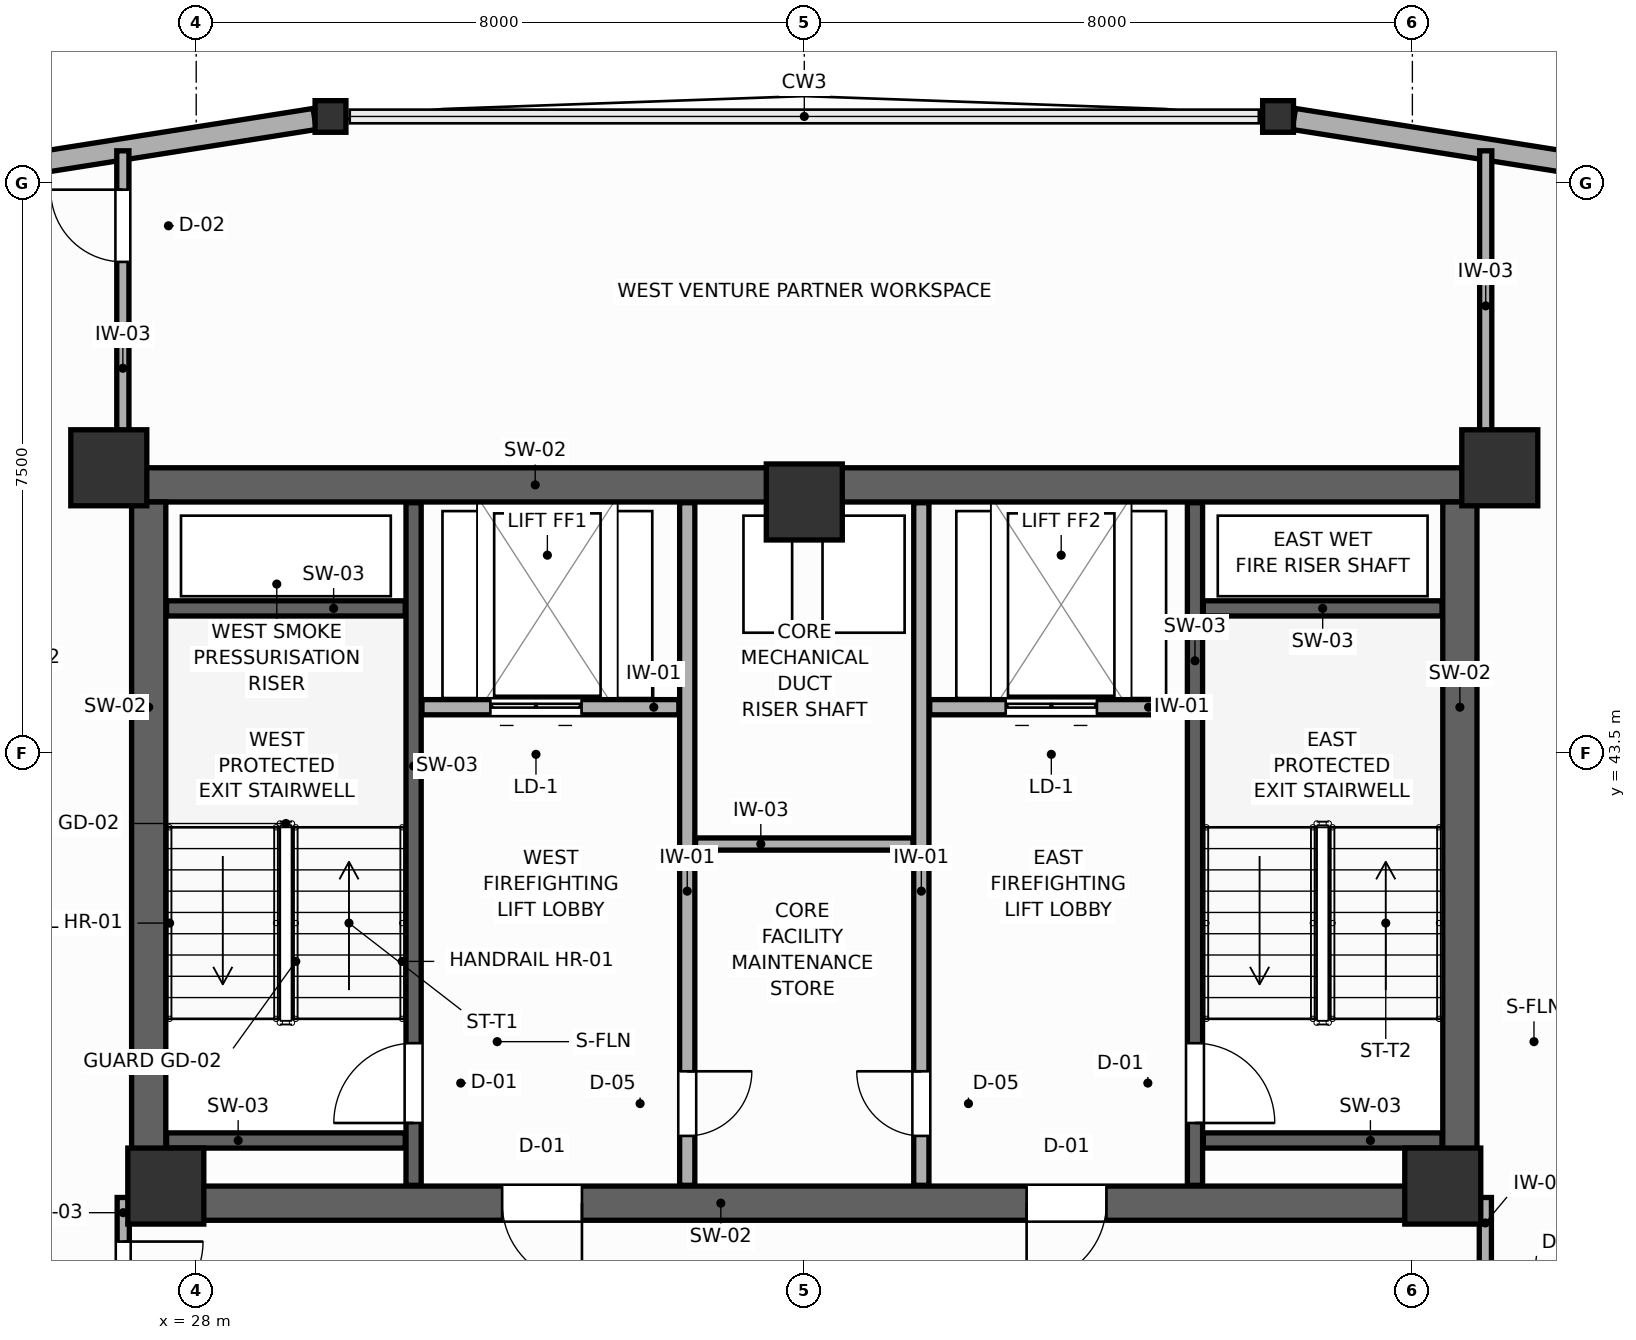
"""IFC4 building model, lengths in metres.
Left out: names, types, materials, properties, quantities, classifications, styles, units other than length and angle.
Written with IfcOpenShell. Run it as: python <this file> out.ifc"""

import sys

from ifc_helpers import new_model, si_unit, direction, frame, frame_2d, origin, origin_2d, place, context, subcontext, project, spatial, rectangle, i_section, extrude, source, transform, mapped, element, fill, save


model = new_model("IFC4")
c1 = context("Model", 3, precision=1e-05, world=origin(), true_north=direction((0.0, 1.0)))
c2 = subcontext(c1, "Body", "Model", "MODEL_VIEW")
j1 = project(units=[si_unit("LENGTHUNIT", "METRE"), si_unit("PLANEANGLEUNIT", "RADIAN")], contexts=[c1])
p1 = place(None, origin())
s1 = spatial("IfcSite", under=j1, at=p1, CompositionType="ELEMENT")
p2 = place(p1, origin())
s2 = spatial("IfcBuilding", under=s1, at=p2, CompositionType="ELEMENT")
p3 = place(p2, frame((0.0, 0.0, 190.2)))
s3 = spatial("IfcBuildingStorey", under=s2, at=p3, CompositionType="ELEMENT", Elevation=190.2)
p4 = place(p3, frame((27.15, 47.025, 0.0), z_axis=(0.0, 0.0, 1.0), x_axis=(1.0, 0.0, 0.0)))
e1 = element("IfcWall", 1, at=p4, inside=s3, PredefinedType="SHEAR", context=c2, shape_type="SweptSolid", body=[
    extrude(rectangle(XDim=17.7, YDim=0.45, at=frame_2d((8.85, 0.0))), origin(), (0.0, 0.0, 1.0), 3.6),
])
p5 = place(p3, frame((27.15, 37.575, 0.0), z_axis=(0.0, 0.0, 1.0), x_axis=(1.0, 0.0, 0.0)))
e2 = element("IfcWall", 2, at=p5, inside=s3, PredefinedType="SHEAR", context=c2, shape_type="SweptSolid", body=[
    extrude(rectangle(XDim=17.7, YDim=0.45, at=frame_2d((8.85, 0.0))), origin(), (0.0, 0.0, 1.0), 3.6),
])
p6 = place(p5, frame((4.875, 0.0, 0.0)))
e3 = element("IfcOpeningElement", 3, at=p6, cuts=e2, PredefinedType="OPENING", context=c2, shape_type="SweptSolid", body=[
    extrude(rectangle(XDim=1.05, YDim=2.1, at=frame_2d((0.525, 1.05))), frame((0.0, 0.235, 0.0), z_axis=(0.0, -1.0, 0.0), x_axis=(1.0, 0.0, 0.0)), (0.0, 0.0, 1.0), 0.47),
])
p7 = place(p5, frame((11.775, 0.0, 0.0)))
e4 = element("IfcOpeningElement", 4, at=p7, cuts=e2, PredefinedType="OPENING", context=c2, shape_type="SweptSolid", body=[
    extrude(rectangle(XDim=1.05, YDim=2.1, at=frame_2d((0.525, 1.05))), frame((0.0, 0.235, 0.0), z_axis=(0.0, -1.0, 0.0), x_axis=(1.0, 0.0, 0.0)), (0.0, 0.0, 1.0), 0.47),
])
for number, where, z_axis, x_axis in (
    (5, (27.375, 37.8, 0.0), (0.0, 0.0, 1.0), (0.0, 1.0, 0.0)),
    (6, (44.625, 37.8, 0.0), (0.0, 0.0, 1.0), (0.0, 1.0, 0.0)),
):
    element("IfcWall", number, at=place(p3, frame(where, z_axis=z_axis, x_axis=x_axis)), inside=s3, PredefinedType="SHEAR", context=c2, shape_type="SweptSolid", body=[
        extrude(rectangle(XDim=9.0, YDim=0.45, at=frame_2d((4.5, 0.0))), origin(), (0.0, 0.0, 1.0), 3.6),
    ])
m1 = source(origin(), c2, "Body", "SweptSolid", [
    extrude(rectangle(XDim=1.0, YDim=1.0, at=origin_2d()), origin(), (0.0, 0.0, 1.0), 3.6),
])
for number, where, z_axis, x_axis in (
    (7, (26.85, 47.25, 0.0), (0.0, 0.0, 1.0), (1.0, 0.0, 0.0)),
    (8, (45.15, 47.25, 0.0), (0.0, 0.0, 1.0), (1.0, 0.0, 0.0)),
    (9, (27.6, 37.8, 0.0), (0.0, 0.0, 1.0), (1.0, 0.0, 0.0)),
    (10, (44.4, 37.8, 0.0), (0.0, 0.0, 1.0), (1.0, 0.0, 0.0)),
    (11, (36.0, 46.8, 0.0), (0.0, 0.0, 1.0), (1.0, 0.0, 0.0)),
):
    element("IfcColumn", number, at=place(p3, frame(where, z_axis=z_axis, x_axis=x_axis)), inside=s3, PredefinedType="COLUMN", context=c2, shape_type="MappedRepresentation", body=[
        mapped(m1, transform((0.0, 0.0, 0.0), scale=1.0)),
    ])
m2 = source(origin(), c2, "Body", "SweptSolid", [
    extrude(i_section(OverallWidth=0.406, OverallDepth=0.416, WebThickness=0.027, FlangeThickness=0.044, FilletRadius=0.015, at=origin_2d()), origin(), (0.0, 0.0, 1.0), 3.6),
])
for number, where, z_axis, x_axis in (
    (12, (42.233, 51.872, 0.0), (0.0, 0.0, 1.0), (1.0, 0.0, 0.0)),
    (13, (29.767, 51.872, 0.0), (0.0, 0.0, 1.0), (1.0, 0.0, 0.0)),
):
    element("IfcColumn", number, at=place(p3, frame(where, z_axis=z_axis, x_axis=x_axis)), inside=s3, PredefinedType="COLUMN", context=c2, shape_type="MappedRepresentation", body=[
        mapped(m2, transform((0.0, 0.0, 0.0), scale=1.0)),
    ])
p8 = place(p3, frame((56.258, 49.656, 0.0), z_axis=(0.0, 0.0, 1.0), x_axis=(-0.987743003355, 0.15608894683, 0.0)))
e14 = element("IfcWall", 14, at=p8, inside=s3, PredefinedType="SOLIDWALL", context=c2, shape_type="SweptSolid", body=[
    extrude(rectangle(XDim=13.988, YDim=0.28, at=frame_2d((6.994, 0.0))), origin(), (0.0, 0.0, 1.0), 3.01),
])
p9 = place(p3, frame((29.559, 51.839, 0.0), z_axis=(0.0, 0.0, 1.0), x_axis=(-0.987743003355, -0.15608894683, 0.0)))
e15 = element("IfcWall", 15, at=p9, inside=s3, PredefinedType="SOLIDWALL", context=c2, shape_type="SweptSolid", body=[
    extrude(rectangle(XDim=13.988, YDim=0.28, at=frame_2d((6.994, 0.0))), origin(), (0.0, 0.0, 1.0), 2.95),
])
p10 = place(p3, frame((30.86, 37.81, 0.0), z_axis=(0.0, 0.0, 1.0), x_axis=(0.0, 1.0, 0.0)))
e16 = element("IfcWall", 16, at=p10, inside=s3, PredefinedType="SHEAR", context=c2, shape_type="SweptSolid", body=[
    extrude(rectangle(XDim=8.98, YDim=0.2, at=frame_2d((4.49, 0.0))), origin(), (0.0, 0.0, 1.0), 3.6),
])
p11 = place(p10, frame((0.82, 0.0, 0.0)))
e17 = element("IfcOpeningElement", 17, at=p11, cuts=e16, PredefinedType="OPENING", context=c2, shape_type="SweptSolid", body=[
    extrude(rectangle(XDim=1.05, YDim=2.1, at=frame_2d((0.525, 1.05))), frame((0.0, 0.11, 0.0), z_axis=(0.0, -1.0, 0.0), x_axis=(1.0, 0.0, 0.0)), (0.0, 0.0, 1.0), 0.22),
])
for number, where, z_axis, x_axis in (
    (18, (27.61, 45.4, 0.0), (0.0, 0.0, 1.0), (1.0, 0.0, 0.0)),
    (19, (27.61, 38.4, 0.0), (0.0, 0.0, 1.0), (1.0, 0.0, 0.0)),
):
    element("IfcWall", number, at=place(p3, frame(where, z_axis=z_axis, x_axis=x_axis)), inside=s3, PredefinedType="SHEAR", context=c2, shape_type="SweptSolid", body=[
        extrude(rectangle(XDim=3.14, YDim=0.2, at=frame_2d((1.57, 0.0))), origin(), (0.0, 0.0, 1.0), 3.6),
    ])
p12 = place(p3, frame((41.14, 37.81, 0.0), z_axis=(0.0, 0.0, 1.0), x_axis=(0.0, 1.0, 0.0)))
e20 = element("IfcWall", 20, at=p12, inside=s3, PredefinedType="SHEAR", context=c2, shape_type="SweptSolid", body=[
    extrude(rectangle(XDim=8.98, YDim=0.2, at=frame_2d((4.49, 0.0))), origin(), (0.0, 0.0, 1.0), 3.6),
])
p13 = place(p12, frame((0.82, 0.0, 0.0)))
e21 = element("IfcOpeningElement", 21, at=p13, cuts=e20, PredefinedType="OPENING", context=c2, shape_type="SweptSolid", body=[
    extrude(rectangle(XDim=1.05, YDim=2.1, at=frame_2d((0.525, 1.05))), frame((0.0, 0.11, 0.0), z_axis=(0.0, -1.0, 0.0), x_axis=(1.0, 0.0, 0.0)), (0.0, 0.0, 1.0), 0.22),
])
for number, where, z_axis, x_axis in (
    (22, (41.25, 45.4, 0.0), (0.0, 0.0, 1.0), (1.0, 0.0, 0.0)),
    (23, (41.25, 38.4, 0.0), (0.0, 0.0, 1.0), (1.0, 0.0, 0.0)),
):
    element("IfcWall", number, at=place(p3, frame(where, z_axis=z_axis, x_axis=x_axis)), inside=s3, PredefinedType="SHEAR", context=c2, shape_type="SweptSolid", body=[
        extrude(rectangle(XDim=3.14, YDim=0.2, at=frame_2d((1.57, 0.0))), origin(), (0.0, 0.0, 1.0), 3.6),
    ])
p14 = place(p3, frame((30.97, 44.1, 0.0), z_axis=(0.0, 0.0, 1.0), x_axis=(1.0, 0.0, 0.0)))
e24 = element("IfcWall", 24, at=p14, inside=s3, PredefinedType="PARTITIONING", context=c2, shape_type="SweptSolid", body=[
    extrude(rectangle(XDim=3.38, YDim=0.2, at=frame_2d((1.69, 0.0))), origin(), (0.0, 0.0, 1.0), 3.4),
])
p15 = place(p14, frame((0.9, 0.0, 0.0)))
e25 = element("IfcOpeningElement", 25, at=p15, cuts=e24, PredefinedType="OPENING", context=c2, shape_type="SweptSolid", body=[
    extrude(rectangle(XDim=1.2, YDim=2.1, at=frame_2d((0.6, 1.05))), frame((0.0, 0.11, 0.0), z_axis=(0.0, -1.0, 0.0), x_axis=(1.0, 0.0, 0.0)), (0.0, 0.0, 1.0), 0.22),
])
p16 = place(p3, frame((37.65, 44.1, 0.0), z_axis=(0.0, 0.0, 1.0), x_axis=(1.0, 0.0, 0.0)))
e26 = element("IfcWall", 26, at=p16, inside=s3, PredefinedType="PARTITIONING", context=c2, shape_type="SweptSolid", body=[
    extrude(rectangle(XDim=3.38, YDim=0.2, at=frame_2d((1.69, 0.0))), origin(), (0.0, 0.0, 1.0), 3.4),
])
p17 = place(p16, frame((1.0, 0.0, 0.0)))
e27 = element("IfcOpeningElement", 27, at=p17, cuts=e26, PredefinedType="OPENING", context=c2, shape_type="SweptSolid", body=[
    extrude(rectangle(XDim=1.2, YDim=2.1, at=frame_2d((0.6, 1.05))), frame((0.0, 0.11, 0.0), z_axis=(0.0, -1.0, 0.0), x_axis=(1.0, 0.0, 0.0)), (0.0, 0.0, 1.0), 0.22),
])
p18 = place(p3, frame((34.46, 37.81, 0.0), z_axis=(0.0, 0.0, 1.0), x_axis=(0.0, 1.0, 0.0)))
e28 = element("IfcWall", 28, at=p18, inside=s3, PredefinedType="PARTITIONING", context=c2, shape_type="SweptSolid", body=[
    extrude(rectangle(XDim=8.98, YDim=0.2, at=frame_2d((4.49, 0.0))), origin(), (0.0, 0.0, 1.0), 3.4),
])
p19 = place(p18, frame((0.65, 0.0, 0.0)))
e29 = element("IfcOpeningElement", 29, at=p19, cuts=e28, PredefinedType="OPENING", context=c2, shape_type="SweptSolid", body=[
    extrude(rectangle(XDim=0.85, YDim=2.05, at=frame_2d((0.425, 1.025))), frame((0.0, 0.11, 0.0), z_axis=(0.0, -1.0, 0.0), x_axis=(1.0, 0.0, 0.0)), (0.0, 0.0, 1.0), 0.22),
])
p20 = place(p3, frame((37.54, 37.81, 0.0), z_axis=(0.0, 0.0, 1.0), x_axis=(0.0, 1.0, 0.0)))
e30 = element("IfcWall", 30, at=p20, inside=s3, PredefinedType="PARTITIONING", context=c2, shape_type="SweptSolid", body=[
    extrude(rectangle(XDim=8.98, YDim=0.2, at=frame_2d((4.49, 0.0))), origin(), (0.0, 0.0, 1.0), 3.4),
])
p21 = place(p20, frame((0.65, 0.0, 0.0)))
e31 = element("IfcOpeningElement", 31, at=p21, cuts=e30, PredefinedType="OPENING", context=c2, shape_type="SweptSolid", body=[
    extrude(rectangle(XDim=0.85, YDim=2.05, at=frame_2d((0.425, 1.025))), frame((0.0, 0.11, 0.0), z_axis=(0.0, -1.0, 0.0), x_axis=(1.0, 0.0, 0.0)), (0.0, 0.0, 1.0), 0.22),
])
p22 = place(p3, frame((34.57, 42.3, 0.0), z_axis=(0.0, 0.0, 1.0), x_axis=(1.0, 0.0, 0.0)))
e32 = element("IfcWall", 32, at=p22, inside=s3, PredefinedType="PARTITIONING", context=c2, shape_type="SweptSolid", body=[
    extrude(rectangle(XDim=2.86, YDim=0.16, at=frame_2d((1.43, 0.0))), origin(), (0.0, 0.0, 1.0), 3.4),
])
p23 = place(p3, frame((27.04, 35.54, 0.0), z_axis=(0.0, 0.0, 1.0), x_axis=(0.0, 1.0, 0.0)))
e33 = element("IfcWall", 33, at=p23, inside=s3, PredefinedType="PARTITIONING", context=c2, shape_type="SweptSolid", body=[
    extrude(rectangle(XDim=2.11, YDim=0.16, at=frame_2d((1.055, 0.0))), origin(), (0.0, 0.0, 1.0), 3.4),
])
p24 = place(p23, frame((0.48, 0.0, 0.0)))
e34 = element("IfcOpeningElement", 34, at=p24, cuts=e33, PredefinedType="OPENING", context=c2, shape_type="SweptSolid", body=[
    extrude(rectangle(XDim=1.05, YDim=2.1, at=frame_2d((0.525, 1.05))), frame((0.0, 0.09, 0.0), z_axis=(0.0, -1.0, 0.0), x_axis=(1.0, 0.0, 0.0)), (0.0, 0.0, 1.0), 0.18),
])
p25 = place(p3, frame((44.96, 35.0, 0.0), z_axis=(0.0, 0.0, 1.0), x_axis=(0.0, 1.0, 0.0)))
e35 = element("IfcWall", 35, at=p25, inside=s3, PredefinedType="PARTITIONING", context=c2, shape_type="SweptSolid", body=[
    extrude(rectangle(XDim=2.65, YDim=0.16, at=frame_2d((1.325, 0.0))), origin(), (0.0, 0.0, 1.0), 3.4),
])
p26 = place(p25, frame((0.75, 0.0, 0.0)))
e36 = element("IfcOpeningElement", 36, at=p26, cuts=e35, PredefinedType="OPENING", context=c2, shape_type="SweptSolid", body=[
    extrude(rectangle(XDim=1.05, YDim=2.1, at=frame_2d((0.525, 1.05))), frame((0.0, 0.09, 0.0), z_axis=(0.0, -1.0, 0.0), x_axis=(1.0, 0.0, 0.0)), (0.0, 0.0, 1.0), 0.18),
])
p27 = place(p3, frame((27.035, 47.34, 0.0), z_axis=(0.0, 0.0, 1.0), x_axis=(0.0, 1.0, 0.0)))
e37 = element("IfcWall", 37, at=p27, inside=s3, PredefinedType="PARTITIONING", context=c2, shape_type="SweptSolid", body=[
    extrude(rectangle(XDim=4.08, YDim=0.16, at=frame_2d((2.04, 0.0))), origin(), (0.0, 0.0, 1.0), 3.4),
])
p28 = place(p27, frame((2.618, 0.0, 0.0)))
e38 = element("IfcOpeningElement", 38, at=p28, cuts=e37, PredefinedType="OPENING", context=c2, shape_type="SweptSolid", body=[
    extrude(rectangle(XDim=0.95, YDim=2.05, at=frame_2d((0.475, 1.025))), frame((0.0, 0.09, 0.0), z_axis=(0.0, -1.0, 0.0), x_axis=(1.0, 0.0, 0.0)), (0.0, 0.0, 1.0), 0.18),
])
p29 = place(p3, frame((44.965, 47.34, 0.0), z_axis=(0.0, 0.0, 1.0), x_axis=(0.0, 1.0, 0.0)))
e39 = element("IfcWall", 39, at=p29, inside=s3, PredefinedType="PARTITIONING", context=c2, shape_type="SweptSolid", body=[
    extrude(rectangle(XDim=4.08, YDim=0.16, at=frame_2d((2.04, 0.0))), origin(), (0.0, 0.0, 1.0), 3.4),
])
p30 = place(p11, origin())
e40 = element("IfcDoor", 40, at=p30, inside=s3, OperationType="SINGLE_SWING_LEFT", PredefinedType="DOOR", context=c2, shape_type="SweptSolid", body=[
    extrude(rectangle(XDim=1.05, YDim=2.1, at=frame_2d((0.525, 1.05))), frame((0.0, 0.025, 0.0), z_axis=(0.0, -1.0, 0.0), x_axis=(1.0, 0.0, 0.0)), (0.0, 0.0, 1.0), 0.05),
])
fill(e17, e40)
p31 = place(p13, frame((1.05, 0.0, 0.0), z_axis=(0.0, 0.0, 1.0), x_axis=(-1.0, 0.0, 0.0)))
e41 = element("IfcDoor", 41, at=p31, inside=s3, OperationType="SINGLE_SWING_RIGHT", PredefinedType="DOOR", context=c2, shape_type="SweptSolid", body=[
    extrude(rectangle(XDim=1.05, YDim=2.1, at=frame_2d((0.525, 1.05))), frame((0.0, 0.025, 0.0), z_axis=(0.0, -1.0, 0.0), x_axis=(1.0, 0.0, 0.0)), (0.0, 0.0, 1.0), 0.05),
])
fill(e21, e41)
p32 = place(p15, origin())
e42 = element("IfcDoor", 42, at=p32, inside=s3, OperationType="DOUBLE_DOOR_SLIDING", PredefinedType="DOOR", context=c2, shape_type="SweptSolid", body=[
    extrude(rectangle(XDim=1.2, YDim=2.1, at=frame_2d((0.6, 1.05))), frame((0.0, 0.025, 0.0), z_axis=(0.0, -1.0, 0.0), x_axis=(1.0, 0.0, 0.0)), (0.0, 0.0, 1.0), 0.05),
])
fill(e25, e42)
p33 = place(p17, origin())
e43 = element("IfcDoor", 43, at=p33, inside=s3, OperationType="DOUBLE_DOOR_SLIDING", PredefinedType="DOOR", context=c2, shape_type="SweptSolid", body=[
    extrude(rectangle(XDim=1.2, YDim=2.1, at=frame_2d((0.6, 1.05))), frame((0.0, 0.025, 0.0), z_axis=(0.0, -1.0, 0.0), x_axis=(1.0, 0.0, 0.0)), (0.0, 0.0, 1.0), 0.05),
])
fill(e27, e43)
p34 = place(p19, frame((0.85, 0.0, 0.0), z_axis=(0.0, 0.0, 1.0), x_axis=(-1.0, 0.0, 0.0)))
e44 = element("IfcDoor", 44, at=p34, inside=s3, OperationType="SINGLE_SWING_LEFT", PredefinedType="DOOR", context=c2, shape_type="SweptSolid", body=[
    extrude(rectangle(XDim=0.85, YDim=2.05, at=frame_2d((0.425, 1.025))), frame((0.0, 0.025, 0.0), z_axis=(0.0, -1.0, 0.0), x_axis=(1.0, 0.0, 0.0)), (0.0, 0.0, 1.0), 0.05),
])
fill(e29, e44)
p35 = place(p21, origin())
e45 = element("IfcDoor", 45, at=p35, inside=s3, OperationType="SINGLE_SWING_RIGHT", PredefinedType="DOOR", context=c2, shape_type="SweptSolid", body=[
    extrude(rectangle(XDim=0.85, YDim=2.05, at=frame_2d((0.425, 1.025))), frame((0.0, 0.025, 0.0), z_axis=(0.0, -1.0, 0.0), x_axis=(1.0, 0.0, 0.0)), (0.0, 0.0, 1.0), 0.05),
])
fill(e31, e45)
p36 = place(p24, frame((1.05, 0.0, 0.0), z_axis=(0.0, 0.0, 1.0), x_axis=(-1.0, 0.0, 0.0)))
e46 = element("IfcDoor", 46, at=p36, inside=s3, OperationType="SINGLE_SWING_LEFT", PredefinedType="DOOR", context=c2, shape_type="SweptSolid", body=[
    extrude(rectangle(XDim=1.05, YDim=2.1, at=frame_2d((0.525, 1.05))), frame((0.0, 0.025, 0.0), z_axis=(0.0, -1.0, 0.0), x_axis=(1.0, 0.0, 0.0)), (0.0, 0.0, 1.0), 0.05),
])
fill(e34, e46)
p37 = place(p28, origin())
e47 = element("IfcDoor", 47, at=p37, inside=s3, OperationType="SINGLE_SWING_RIGHT", PredefinedType="DOOR", context=c2, shape_type="SweptSolid", body=[
    extrude(rectangle(XDim=0.95, YDim=2.05, at=frame_2d((0.475, 1.025))), frame((0.0, 0.025, 0.0), z_axis=(0.0, -1.0, 0.0), x_axis=(1.0, 0.0, 0.0)), (0.0, 0.0, 1.0), 0.05),
])
fill(e38, e47)
p38 = place(p6, frame((1.05, 0.0, 0.0), z_axis=(0.0, 0.0, 1.0), x_axis=(-1.0, 0.0, 0.0)))
e48 = element("IfcDoor", 48, at=p38, inside=s3, OperationType="SINGLE_SWING_LEFT", PredefinedType="DOOR", context=c2, shape_type="SweptSolid", body=[
    extrude(rectangle(XDim=1.05, YDim=2.1, at=frame_2d((0.525, 1.05))), frame((0.0, 0.025, 0.0), z_axis=(0.0, -1.0, 0.0), x_axis=(1.0, 0.0, 0.0)), (0.0, 0.0, 1.0), 0.05),
])
fill(e3, e48)
p39 = place(p7, frame((1.05, 0.0, 0.0), z_axis=(0.0, 0.0, 1.0), x_axis=(-1.0, 0.0, 0.0)))
e49 = element("IfcDoor", 49, at=p39, inside=s3, OperationType="SINGLE_SWING_RIGHT", PredefinedType="DOOR", context=c2, shape_type="SweptSolid", body=[
    extrude(rectangle(XDim=1.05, YDim=2.1, at=frame_2d((0.525, 1.05))), frame((0.0, 0.025, 0.0), z_axis=(0.0, -1.0, 0.0), x_axis=(1.0, 0.0, 0.0)), (0.0, 0.0, 1.0), 0.05),
])
fill(e4, e49)
save(model, sys.argv[1])
